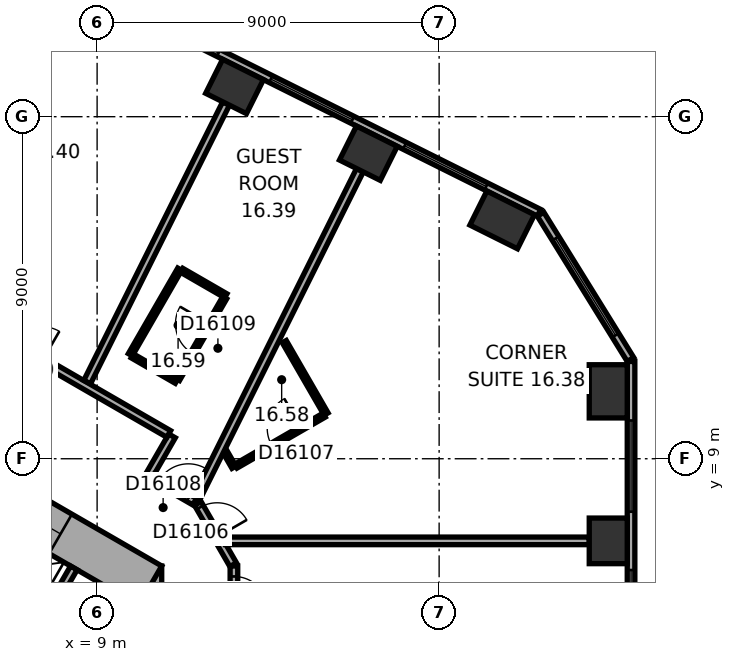
"""IFC4 building model, lengths in metres.
Left out: names, types, materials, properties, quantities, classifications, styles, units other than length and angle.
Written with IfcOpenShell. Run it as: python <this file> out.ifc"""

import sys

from ifc_helpers import new_model, si_unit, direction, frame, frame_2d, origin, origin_2d, place, context, subcontext, project, spatial, rectangle, extrude, element, fill, save


model = new_model("IFC4")
c1 = context("Model", 3, precision=1e-05, world=origin(), true_north=direction((0.0, 1.0)))
c2 = subcontext(c1, "Body", "Model", "MODEL_VIEW")
j1 = project(units=[si_unit("LENGTHUNIT", "METRE"), si_unit("PLANEANGLEUNIT", "RADIAN")], contexts=[c1])
p1 = place(None, origin())
s1 = spatial("IfcSite", under=j1, at=p1, CompositionType="ELEMENT")
p2 = place(p1, origin())
s2 = spatial("IfcBuilding", under=s1, at=p2, CompositionType="ELEMENT")
p3 = place(p2, frame((0.0, 0.0, 73.7)))
s3 = spatial("IfcBuildingStorey", under=s2, at=p3, CompositionType="ELEMENT", Elevation=73.7)
p4 = place(p3, frame((22.45, 6.839, 0.0), z_axis=(0.0, 0.0, 1.0), x_axis=(0.0, 1.0, 0.0)))
e1 = element("IfcColumn", 1, at=p4, inside=s3, PredefinedType="COLUMN", context=c2, shape_type="SweptSolid", body=[
    extrude(rectangle(XDim=1.2, YDim=1.0, at=origin_2d()), origin(), (0.0, 0.0, 1.0), 3.3),
])
for number, where, z_axis, x_axis in (
    (2, (22.45, 10.774, 0.0), (0.0, 0.0, 1.0), (0.0, 1.0, 0.0)),
    (3, (19.659, 15.284, 0.0), (0.0, 0.0, 1.0), (-0.895, 0.446, 0.0)),
):
    element("IfcColumn", number, at=place(p3, frame(where, z_axis=z_axis, x_axis=x_axis)), inside=s3, PredefinedType="COLUMN", context=c2, shape_type="SweptSolid", body=[
        extrude(rectangle(XDim=1.4, YDim=1.0, at=origin_2d()), origin(), (0.0, 0.0, 1.0), 3.3),
    ])
for number, where, z_axis, x_axis in (
    (4, (16.138, 17.04, 0.0), (0.0, 0.0, 1.0), (-0.895, 0.446, 0.0)),
    (5, (12.616, 18.795, 0.0), (0.0, 0.0, 1.0), (-0.895, 0.446, 0.0)),
):
    element("IfcColumn", number, at=place(p3, frame(where, z_axis=z_axis, x_axis=x_axis)), inside=s3, PredefinedType="COLUMN", context=c2, shape_type="SweptSolid", body=[
        extrude(rectangle(XDim=1.2, YDim=1.0, at=origin_2d()), origin(), (0.0, 0.0, 1.0), 3.3),
    ])
p5 = place(p3, frame((10.1, -6.177, 0.0), z_axis=(0.0, 0.0, 1.0), x_axis=(0.0, 1.0, 0.0)))
e6 = element("IfcWall", 6, at=p5, inside=s3, PredefinedType="SHEAR", context=c2, shape_type="SweptSolid", body=[
    extrude(rectangle(XDim=12.355, YDim=1.2, at=frame_2d((6.177, 0.0))), origin(), (0.0, 0.0, 1.0), 3.3),
])
p6 = place(p5, frame((6.378, 0.0, 0.0)))
e7 = element("IfcOpeningElement", 7, at=p6, cuts=e6, PredefinedType="OPENING", context=c2, shape_type="SweptSolid", body=[
    extrude(rectangle(XDim=1.5, YDim=2.1, at=frame_2d((0.75, 1.05))), frame((0.0, 0.61, 0.0), z_axis=(0.0, -1.0, 0.0), x_axis=(1.0, 0.0, 0.0)), (0.0, 0.0, 1.0), 1.22),
])
p7 = place(p5, frame((1.828, 0.0, 0.0)))
e8 = element("IfcOpeningElement", 8, at=p7, cuts=e6, PredefinedType="OPENING", context=c2, shape_type="SweptSolid", body=[
    extrude(rectangle(XDim=1.1, YDim=2.1, at=frame_2d((0.55, 1.05))), frame((0.0, 0.61, 0.0), z_axis=(0.0, -1.0, 0.0), x_axis=(1.0, 0.0, 0.0)), (0.0, 0.0, 1.0), 1.22),
])
p8 = place(p5, frame((4.427, 0.0, 0.0)))
e9 = element("IfcOpeningElement", 9, at=p8, cuts=e6, PredefinedType="OPENING", context=c2, shape_type="SweptSolid", body=[
    extrude(rectangle(XDim=1.1, YDim=2.1, at=frame_2d((0.55, 1.05))), frame((0.0, 0.61, 0.0), z_axis=(0.0, -1.0, 0.0), x_axis=(1.0, 0.0, 0.0)), (0.0, 0.0, 1.0), 1.22),
])
p9 = place(p3, frame((10.4, 5.658, 0.0), z_axis=(0.0, 0.0, 1.0), x_axis=(-0.866021384402, 0.500006961711, 0.0)))
e10 = element("IfcWall", 10, at=p9, inside=s3, PredefinedType="SHEAR", context=c2, shape_type="SweptSolid", body=[
    extrude(rectangle(XDim=12.355, YDim=1.2, at=frame_2d((6.178, 0.0))), origin(), (0.0, 0.0, 1.0), 3.3),
])
p10 = place(p9, frame((2.728, 0.0, 0.0)))
e11 = element("IfcOpeningElement", 11, at=p10, cuts=e10, PredefinedType="OPENING", context=c2, shape_type="SweptSolid", body=[
    extrude(rectangle(XDim=1.1, YDim=2.1, at=frame_2d((0.55, 1.05))), frame((0.0, 0.61, 0.0), z_axis=(0.0, -1.0, 0.0), x_axis=(1.0, 0.0, 0.0)), (0.0, 0.0, 1.0), 1.22),
])
p11 = place(p9, frame((5.328, 0.0, 0.0)))
e12 = element("IfcOpeningElement", 12, at=p11, cuts=e10, PredefinedType="OPENING", context=c2, shape_type="SweptSolid", body=[
    extrude(rectangle(XDim=1.1, YDim=2.1, at=frame_2d((0.55, 1.05))), frame((0.0, 0.61, 0.0), z_axis=(0.0, -1.0, 0.0), x_axis=(1.0, 0.0, 0.0)), (0.0, 0.0, 1.0), 1.22),
])
p12 = place(p9, frame((7.928, 0.0, 0.0)))
e13 = element("IfcOpeningElement", 13, at=p12, cuts=e10, PredefinedType="OPENING", context=c2, shape_type="SweptSolid", body=[
    extrude(rectangle(XDim=1.1, YDim=2.1, at=frame_2d((0.55, 1.05))), frame((0.0, 0.61, 0.0), z_axis=(0.0, -1.0, 0.0), x_axis=(1.0, 0.0, 0.0)), (0.0, 0.0, 1.0), 1.22),
])
p13 = place(p3, frame((23.05, -9.687, 0.0), z_axis=(0.0, 0.0, 1.0), x_axis=(0.0, 1.0, 0.0)))
e14 = element("IfcWall", 14, at=p13, inside=s3, PredefinedType="STANDARD", context=c2, shape_type="SweptSolid", body=[
    extrude(rectangle(XDim=21.246, YDim=0.2, at=frame_2d((10.623, 0.0))), origin(), (0.0, 0.0, 1.0), 3.3),
])
p14 = place(p13, frame((1.555, 0.0, 0.8)))
e15 = element("IfcOpeningElement", 15, at=p14, cuts=e14, PredefinedType="OPENING", context=c2, shape_type="SweptSolid", body=[
    extrude(rectangle(XDim=2.4, YDim=1.7, at=frame_2d((1.2, 0.85))), frame((0.0, 0.11, 0.0), z_axis=(0.0, -1.0, 0.0), x_axis=(1.0, 0.0, 0.0)), (0.0, 0.0, 1.0), 0.22),
])
p15 = place(p13, frame((5.489, 0.0, 0.8)))
e16 = element("IfcOpeningElement", 16, at=p15, cuts=e14, PredefinedType="OPENING", context=c2, shape_type="SweptSolid", body=[
    extrude(rectangle(XDim=2.4, YDim=1.7, at=frame_2d((1.2, 0.85))), frame((0.0, 0.11, 0.0), z_axis=(0.0, -1.0, 0.0), x_axis=(1.0, 0.0, 0.0)), (0.0, 0.0, 1.0), 0.22),
])
p16 = place(p13, frame((9.424, 0.0, 0.8)))
e17 = element("IfcOpeningElement", 17, at=p16, cuts=e14, PredefinedType="OPENING", context=c2, shape_type="SweptSolid", body=[
    extrude(rectangle(XDim=2.4, YDim=1.7, at=frame_2d((1.2, 0.85))), frame((0.0, 0.11, 0.0), z_axis=(0.0, -1.0, 0.0), x_axis=(1.0, 0.0, 0.0)), (0.0, 0.0, 1.0), 0.22),
])
p17 = place(p13, frame((13.358, 0.0, 0.8)))
e18 = element("IfcOpeningElement", 18, at=p17, cuts=e14, PredefinedType="OPENING", context=c2, shape_type="SweptSolid", body=[
    extrude(rectangle(XDim=2.4, YDim=1.7, at=frame_2d((1.2, 0.85))), frame((0.0, 0.11, 0.0), z_axis=(0.0, -1.0, 0.0), x_axis=(1.0, 0.0, 0.0)), (0.0, 0.0, 1.0), 0.22),
])
p18 = place(p13, frame((17.293, 0.0, 0.8)))
e19 = element("IfcOpeningElement", 19, at=p18, cuts=e14, PredefinedType="OPENING", context=c2, shape_type="SweptSolid", body=[
    extrude(rectangle(XDim=2.4, YDim=1.7, at=frame_2d((1.2, 0.85))), frame((0.0, 0.11, 0.0), z_axis=(0.0, -1.0, 0.0), x_axis=(1.0, 0.0, 0.0)), (0.0, 0.0, 1.0), 0.22),
])
p19 = place(p3, frame((23.035, 11.612, 0.0), z_axis=(0.0, 0.0, 1.0), x_axis=(-0.526160091227, 0.850385535155, 0.0)))
e20 = element("IfcWall", 20, at=p19, inside=s3, PredefinedType="STANDARD", context=c2, shape_type="SweptSolid", body=[
    extrude(rectangle(XDim=4.494, YDim=0.2, at=frame_2d((2.247, 0.0))), origin(), (0.0, 0.0, 1.0), 3.3),
])
p20 = place(p19, frame((0.747, 0.0, 0.8)))
e21 = element("IfcOpeningElement", 21, at=p20, cuts=e20, PredefinedType="OPENING", context=c2, shape_type="SweptSolid", body=[
    extrude(rectangle(XDim=3.0, YDim=1.7, at=frame_2d((1.5, 0.85))), frame((0.0, 0.11, 0.0), z_axis=(0.0, -1.0, 0.0), x_axis=(1.0, 0.0, 0.0)), (0.0, 0.0, 1.0), 0.22),
])
p21 = place(p3, frame((20.63, 15.47, 0.0), z_axis=(0.0, 0.0, 1.0), x_axis=(-0.894934518609, 0.446197498203, 0.0)))
e22 = element("IfcWall", 22, at=p21, inside=s3, PredefinedType="STANDARD", context=c2, shape_type="SweptSolid", body=[
    extrude(rectangle(XDim=21.246, YDim=0.2, at=frame_2d((10.623, 0.0))), origin(), (0.0, 0.0, 1.0), 3.3),
])
p22 = place(p21, frame((1.553, 0.0, 0.8)))
e23 = element("IfcOpeningElement", 23, at=p22, cuts=e22, PredefinedType="OPENING", context=c2, shape_type="SweptSolid", body=[
    extrude(rectangle(XDim=2.4, YDim=1.7, at=frame_2d((1.2, 0.85))), frame((0.0, 0.11, 0.0), z_axis=(0.0, -1.0, 0.0), x_axis=(1.0, 0.0, 0.0)), (0.0, 0.0, 1.0), 0.22),
])
p23 = place(p21, frame((5.488, 0.0, 0.8)))
e24 = element("IfcOpeningElement", 24, at=p23, cuts=e22, PredefinedType="OPENING", context=c2, shape_type="SweptSolid", body=[
    extrude(rectangle(XDim=2.4, YDim=1.7, at=frame_2d((1.2, 0.85))), frame((0.0, 0.11, 0.0), z_axis=(0.0, -1.0, 0.0), x_axis=(1.0, 0.0, 0.0)), (0.0, 0.0, 1.0), 0.22),
])
p24 = place(p21, frame((9.422, 0.0, 0.8)))
e25 = element("IfcOpeningElement", 25, at=p24, cuts=e22, PredefinedType="OPENING", context=c2, shape_type="SweptSolid", body=[
    extrude(rectangle(XDim=2.4, YDim=1.7, at=frame_2d((1.2, 0.85))), frame((0.0, 0.11, 0.0), z_axis=(0.0, -1.0, 0.0), x_axis=(1.0, 0.0, 0.0)), (0.0, 0.0, 1.0), 0.22),
])
p25 = place(p21, frame((13.357, 0.0, 0.8)))
e26 = element("IfcOpeningElement", 26, at=p25, cuts=e22, PredefinedType="OPENING", context=c2, shape_type="SweptSolid", body=[
    extrude(rectangle(XDim=2.4, YDim=1.7, at=frame_2d((1.2, 0.85))), frame((0.0, 0.11, 0.0), z_axis=(0.0, -1.0, 0.0), x_axis=(1.0, 0.0, 0.0)), (0.0, 0.0, 1.0), 0.22),
])
p26 = place(p21, frame((17.292, 0.0, 0.8)))
e27 = element("IfcOpeningElement", 27, at=p26, cuts=e22, PredefinedType="OPENING", context=c2, shape_type="SweptSolid", body=[
    extrude(rectangle(XDim=2.4, YDim=1.7, at=frame_2d((1.2, 0.85))), frame((0.0, 0.11, 0.0), z_axis=(0.0, -1.0, 0.0), x_axis=(1.0, 0.0, 0.0)), (0.0, 0.0, 1.0), 0.22),
])
p27 = place(p3, frame((7.287, 4.222, 0.0), z_axis=(0.0, 0.0, 1.0), x_axis=(0.499946605688, 0.86605622881, 0.0)))
e28 = element("IfcWall", 28, at=p27, inside=s3, PredefinedType="PARTITIONING", context=c2, shape_type="SweptSolid", body=[
    extrude(rectangle(XDim=2.2, YDim=0.2, at=frame_2d((1.1, 0.0))), origin(), (0.0, 0.0, 1.0), 2.95),
])
p28 = place(p3, frame((9.875, 11.736, 0.0), z_axis=(0.0, 0.0, 1.0), x_axis=(0.499936506574, 0.866062058628, 0.0)))
e29 = element("IfcWall", 29, at=p28, inside=s3, PredefinedType="PARTITIONING", context=c2, shape_type="SweptSolid", body=[
    extrude(rectangle(XDim=2.6, YDim=0.12, at=frame_2d((1.3, 0.0))), origin(), (0.0, 0.0, 1.0), 2.95),
])
p29 = place(p3, frame((10.371, 8.561, 0.0), z_axis=(0.0, 0.0, 1.0), x_axis=(0.499986357472, 0.866033280158, 0.0)))
e30 = element("IfcWall", 30, at=p29, inside=s3, PredefinedType="PARTITIONING", context=c2, shape_type="SweptSolid", body=[
    extrude(rectangle(XDim=1.201, YDim=0.2, at=frame_2d((0.601, 0.0))), origin(), (0.0, 0.0, 1.0), 2.95),
])
p30 = place(p3, frame((10.885, 9.652, 0.0), z_axis=(0.0, 0.0, 1.0), x_axis=(-0.866033277307, 0.499986362411, 0.0)))
e31 = element("IfcWall", 31, at=p30, inside=s3, PredefinedType="PARTITIONING", context=c2, shape_type="SweptSolid", body=[
    extrude(rectangle(XDim=8.702, YDim=0.2, at=frame_2d((4.351, 0.0))), origin(), (0.0, 0.0, 1.0), 2.95),
])
p31 = place(p30, frame((3.844, 0.0, 0.0)))
e32 = element("IfcOpeningElement", 32, at=p31, cuts=e31, PredefinedType="OPENING", context=c2, shape_type="SweptSolid", body=[
    extrude(rectangle(XDim=0.9, YDim=2.1, at=frame_2d((0.45, 1.05))), frame((0.0, 0.11, 0.0), z_axis=(0.0, -1.0, 0.0), x_axis=(1.0, 0.0, 0.0)), (0.0, 0.0, 1.0), 0.22),
])
for number, where, z_axis, x_axis in (
    (33, (11.087, 11.036, 0.0), (0.0, 0.0, 1.0), (-0.866, 0.5, 0.0)),
    (34, (11.226, 13.958, 0.0), (0.0, 0.0, 1.0), (0.866, -0.5, 0.0)),
):
    element("IfcWall", number, at=place(p3, frame(where, z_axis=z_axis, x_axis=x_axis)), inside=s3, PredefinedType="PARTITIONING", context=c2, shape_type="SweptSolid", body=[
        extrude(rectangle(XDim=1.34, YDim=0.12, at=frame_2d((0.67, 0.0))), origin(), (0.0, 0.0, 1.0), 2.95),
    ])
p32 = place(p3, frame((11.566, 7.871, 0.0), z_axis=(0.0, 0.0, 1.0), x_axis=(-0.866004557827, 0.500036104519, 0.0)))
e35 = element("IfcWall", 35, at=p32, inside=s3, PredefinedType="PARTITIONING", context=c2, shape_type="SweptSolid", body=[
    extrude(rectangle(XDim=1.28, YDim=0.2, at=frame_2d((0.64, 0.0))), origin(), (0.0, 0.0, 1.0), 2.95),
])
p33 = place(p32, frame((0.19, 0.0, 0.0)))
e36 = element("IfcOpeningElement", 36, at=p33, cuts=e35, PredefinedType="OPENING", context=c2, shape_type="SweptSolid", body=[
    extrude(rectangle(XDim=0.9, YDim=2.1, at=frame_2d((0.45, 1.05))), frame((0.0, 0.11, 0.0), z_axis=(0.0, -1.0, 0.0), x_axis=(1.0, 0.0, 0.0)), (0.0, 0.0, 1.0), 0.22),
])
p34 = place(p3, frame((12.357, 13.236, 0.0), z_axis=(0.0, 0.0, 1.0), x_axis=(-0.50000366821, -0.866023285932, 0.0)))
e37 = element("IfcWall", 37, at=p34, inside=s3, PredefinedType="PARTITIONING", context=c2, shape_type="SweptSolid", body=[
    extrude(rectangle(XDim=2.48, YDim=0.12, at=frame_2d((1.24, 0.0))), origin(), (0.0, 0.0, 1.0), 2.95),
])
p35 = place(p34, frame((0.79, 0.0, 0.0)))
e38 = element("IfcOpeningElement", 38, at=p35, cuts=e37, PredefinedType="OPENING", context=c2, shape_type="SweptSolid", body=[
    extrude(rectangle(XDim=0.9, YDim=2.1, at=frame_2d((0.45, 1.05))), frame((0.0, 0.07, 0.0), z_axis=(0.0, -1.0, 0.0), x_axis=(1.0, 0.0, 0.0)), (0.0, 0.0, 1.0), 0.14),
])
p36 = place(p3, frame((12.393, 18.348, 0.0), z_axis=(0.0, 0.0, 1.0), x_axis=(-0.446176022699, -0.894945225569, 0.0)))
e39 = element("IfcWall", 39, at=p36, inside=s3, PredefinedType="PARTITIONING", context=c2, shape_type="SweptSolid", body=[
    extrude(rectangle(XDim=8.191, YDim=0.2, at=frame_2d((4.095, 0.0))), origin(), (0.0, 0.0, 1.0), 2.15),
])
p37 = place(p3, frame((12.58, 6.212, 0.0), z_axis=(0.0, 0.0, 1.0), x_axis=(-0.500063286585, 0.865988862174, 0.0)))
e40 = element("IfcWall", 40, at=p37, inside=s3, PredefinedType="PARTITIONING", context=c2, shape_type="SweptSolid", body=[
    extrude(rectangle(XDim=1.86, YDim=0.2, at=frame_2d((0.93, 0.0))), origin(), (0.0, 0.0, 1.0), 2.95),
])
p38 = place(p37, frame((0.842, 0.0, 0.0)))
e41 = element("IfcOpeningElement", 41, at=p38, cuts=e40, PredefinedType="OPENING", context=c2, shape_type="SweptSolid", body=[
    extrude(rectangle(XDim=0.9, YDim=2.1, at=frame_2d((0.45, 1.05))), frame((0.0, 0.11, 0.0), z_axis=(0.0, -1.0, 0.0), x_axis=(1.0, 0.0, 0.0)), (0.0, 0.0, 1.0), 0.22),
])
p39 = place(p3, frame((12.6, 3.004, 0.0), z_axis=(0.0, 0.0, 1.0), x_axis=(0.0, 1.0, 0.0)))
e42 = element("IfcWall", 42, at=p39, inside=s3, PredefinedType="PARTITIONING", context=c2, shape_type="SweptSolid", body=[
    extrude(rectangle(XDim=3.173, YDim=0.2, at=frame_2d((1.586, 0.0))), origin(), (0.0, 0.0, 1.0), 2.95),
])
p40 = place(p39, frame((1.998, 0.0, 0.0)))
e43 = element("IfcOpeningElement", 43, at=p40, cuts=e42, PredefinedType="OPENING", context=c2, shape_type="SweptSolid", body=[
    extrude(rectangle(XDim=0.9, YDim=2.1, at=frame_2d((0.45, 1.05))), frame((0.0, 0.11, 0.0), z_axis=(0.0, -1.0, 0.0), x_axis=(1.0, 0.0, 0.0)), (0.0, 0.0, 1.0), 0.22),
])
p41 = place(p3, frame((12.601, 8.776, 0.0), z_axis=(0.0, 0.0, 1.0), x_axis=(-0.500166486798, 0.865929261247, 0.0)))
e44 = element("IfcWall", 44, at=p41, inside=s3, PredefinedType="PARTITIONING", context=c2, shape_type="SweptSolid", body=[
    extrude(rectangle(XDim=0.476, YDim=0.12, at=frame_2d((0.238, 0.0))), origin(), (0.0, 0.0, 1.0), 2.95),
])
p42 = place(p3, frame((13.926, 12.081, 0.0), z_axis=(0.0, 0.0, 1.0), x_axis=(0.499994660107, -0.866028486751, 0.0)))
e45 = element("IfcWall", 45, at=p42, inside=s3, PredefinedType="PARTITIONING", context=c2, shape_type="SweptSolid", body=[
    extrude(rectangle(XDim=2.2, YDim=0.12, at=frame_2d((1.1, 0.0))), origin(), (0.0, 0.0, 1.0), 2.95),
])
p43 = place(p3, frame((14.974, 10.146, 0.0), z_axis=(0.0, 0.0, 1.0), x_axis=(-0.86599746015, -0.500048396672, 0.0)))
e46 = element("IfcWall", 46, at=p43, inside=s3, PredefinedType="PARTITIONING", context=c2, shape_type="SweptSolid", body=[
    extrude(rectangle(XDim=2.68, YDim=0.12, at=frame_2d((1.34, 0.0))), origin(), (0.0, 0.0, 1.0), 2.95),
])
p44 = place(p43, frame((0.69, 0.0, 0.0)))
e47 = element("IfcOpeningElement", 47, at=p44, cuts=e46, PredefinedType="OPENING", context=c2, shape_type="SweptSolid", body=[
    extrude(rectangle(XDim=0.9, YDim=2.1, at=frame_2d((0.45, 1.05))), frame((0.0, 0.07, 0.0), z_axis=(0.0, -1.0, 0.0), x_axis=(1.0, 0.0, 0.0)), (0.0, 0.0, 1.0), 0.14),
])
p45 = place(p3, frame((15.915, 16.592, 0.0), z_axis=(0.0, 0.0, 1.0), x_axis=(-0.446199736347, -0.894933402709, 0.0)))
e48 = element("IfcWall", 48, at=p45, inside=s3, PredefinedType="PARTITIONING", context=c2, shape_type="SweptSolid", body=[
    extrude(rectangle(XDim=9.635, YDim=0.2, at=frame_2d((4.817, 0.0))), origin(), (0.0, 0.0, 1.0), 2.95),
])
p46 = place(p3, frame((21.95, 6.839, 0.0), z_axis=(0.0, 0.0, 1.0), x_axis=(-1.0, 0.0, 0.0)))
e49 = element("IfcWall", 49, at=p46, inside=s3, PredefinedType="PARTITIONING", context=c2, shape_type="SweptSolid", body=[
    extrude(rectangle(XDim=9.572, YDim=0.2, at=frame_2d((4.786, 0.0))), origin(), (0.0, 0.0, 1.0), 2.95),
])
p47 = place(p17, origin())
e50 = element("IfcWindow", 50, at=p47, inside=s3, PartitioningType="SINGLE_PANEL", PredefinedType="WINDOW", context=c2, shape_type="SweptSolid", body=[
    extrude(rectangle(XDim=2.4, YDim=1.7, at=frame_2d((1.2, 0.85))), frame((0.0, 0.03, 0.0), z_axis=(0.0, -1.0, 0.0), x_axis=(1.0, 0.0, 0.0)), (0.0, 0.0, 1.0), 0.06),
])
fill(e18, e50)
p48 = place(p18, origin())
e51 = element("IfcWindow", 51, at=p48, inside=s3, PartitioningType="SINGLE_PANEL", PredefinedType="WINDOW", context=c2, shape_type="SweptSolid", body=[
    extrude(rectangle(XDim=2.4, YDim=1.7, at=frame_2d((1.2, 0.85))), frame((0.0, 0.03, 0.0), z_axis=(0.0, -1.0, 0.0), x_axis=(1.0, 0.0, 0.0)), (0.0, 0.0, 1.0), 0.06),
])
fill(e19, e51)
p49 = place(p20, origin())
e52 = element("IfcWindow", 52, at=p49, inside=s3, PartitioningType="SINGLE_PANEL", PredefinedType="WINDOW", context=c2, shape_type="SweptSolid", body=[
    extrude(rectangle(XDim=3.0, YDim=1.7, at=frame_2d((1.5, 0.85))), frame((0.0, 0.03, 0.0), z_axis=(0.0, -1.0, 0.0), x_axis=(1.0, 0.0, 0.0)), (0.0, 0.0, 1.0), 0.06),
])
fill(e21, e52)
p50 = place(p22, origin())
e53 = element("IfcWindow", 53, at=p50, inside=s3, PartitioningType="SINGLE_PANEL", PredefinedType="WINDOW", context=c2, shape_type="SweptSolid", body=[
    extrude(rectangle(XDim=2.4, YDim=1.7, at=frame_2d((1.2, 0.85))), frame((0.0, 0.03, 0.0), z_axis=(0.0, -1.0, 0.0), x_axis=(1.0, 0.0, 0.0)), (0.0, 0.0, 1.0), 0.06),
])
fill(e23, e53)
p51 = place(p23, origin())
e54 = element("IfcWindow", 54, at=p51, inside=s3, PartitioningType="SINGLE_PANEL", PredefinedType="WINDOW", context=c2, shape_type="SweptSolid", body=[
    extrude(rectangle(XDim=2.4, YDim=1.7, at=frame_2d((1.2, 0.85))), frame((0.0, 0.03, 0.0), z_axis=(0.0, -1.0, 0.0), x_axis=(1.0, 0.0, 0.0)), (0.0, 0.0, 1.0), 0.06),
])
fill(e24, e54)
p52 = place(p24, origin())
e55 = element("IfcWindow", 55, at=p52, inside=s3, PartitioningType="SINGLE_PANEL", PredefinedType="WINDOW", context=c2, shape_type="SweptSolid", body=[
    extrude(rectangle(XDim=2.4, YDim=1.7, at=frame_2d((1.2, 0.85))), frame((0.0, 0.03, 0.0), z_axis=(0.0, -1.0, 0.0), x_axis=(1.0, 0.0, 0.0)), (0.0, 0.0, 1.0), 0.06),
])
fill(e25, e55)
p53 = place(p10, origin())
e56 = element("IfcDoor", 56, at=p53, inside=s3, OperationType="DOUBLE_DOOR_SLIDING", PredefinedType="DOOR", context=c2, shape_type="SweptSolid", body=[
    extrude(rectangle(XDim=1.1, YDim=2.1, at=frame_2d((0.55, 1.05))), frame((0.0, 0.025, 0.0), z_axis=(0.0, -1.0, 0.0), x_axis=(1.0, 0.0, 0.0)), (0.0, 0.0, 1.0), 0.05),
])
fill(e11, e56)
p54 = place(p40, origin())
e57 = element("IfcDoor", 57, at=p54, inside=s3, OperationType="SINGLE_SWING_LEFT", PredefinedType="DOOR", context=c2, shape_type="SweptSolid", body=[
    extrude(rectangle(XDim=0.9, YDim=2.1, at=frame_2d((0.45, 1.05))), frame((0.0, 0.025, 0.0), z_axis=(0.0, -1.0, 0.0), x_axis=(1.0, 0.0, 0.0)), (0.0, 0.0, 1.0), 0.05),
])
fill(e43, e57)
p55 = place(p38, origin())
e58 = element("IfcDoor", 58, at=p55, inside=s3, OperationType="SINGLE_SWING_LEFT", PredefinedType="DOOR", context=c2, shape_type="SweptSolid", body=[
    extrude(rectangle(XDim=0.9, YDim=2.1, at=frame_2d((0.45, 1.05))), frame((0.0, 0.025, 0.0), z_axis=(0.0, -1.0, 0.0), x_axis=(1.0, 0.0, 0.0)), (0.0, 0.0, 1.0), 0.05),
])
fill(e41, e58)
p56 = place(p44, origin())
e59 = element("IfcDoor", 59, at=p56, inside=s3, OperationType="SINGLE_SWING_LEFT", PredefinedType="DOOR", context=c2, shape_type="SweptSolid", body=[
    extrude(rectangle(XDim=0.9, YDim=2.1, at=frame_2d((0.45, 1.05))), frame((0.0, 0.025, 0.0), z_axis=(0.0, -1.0, 0.0), x_axis=(1.0, 0.0, 0.0)), (0.0, 0.0, 1.0), 0.05),
])
fill(e47, e59)
p57 = place(p33, origin())
e60 = element("IfcDoor", 60, at=p57, inside=s3, OperationType="SINGLE_SWING_LEFT", PredefinedType="DOOR", context=c2, shape_type="SweptSolid", body=[
    extrude(rectangle(XDim=0.9, YDim=2.1, at=frame_2d((0.45, 1.05))), frame((0.0, 0.025, 0.0), z_axis=(0.0, -1.0, 0.0), x_axis=(1.0, 0.0, 0.0)), (0.0, 0.0, 1.0), 0.05),
])
fill(e36, e60)
p58 = place(p35, origin())
e61 = element("IfcDoor", 61, at=p58, inside=s3, OperationType="SINGLE_SWING_LEFT", PredefinedType="DOOR", context=c2, shape_type="SweptSolid", body=[
    extrude(rectangle(XDim=0.9, YDim=2.1, at=frame_2d((0.45, 1.05))), frame((0.0, 0.025, 0.0), z_axis=(0.0, -1.0, 0.0), x_axis=(1.0, 0.0, 0.0)), (0.0, 0.0, 1.0), 0.05),
])
fill(e38, e61)
save(model, sys.argv[1])
